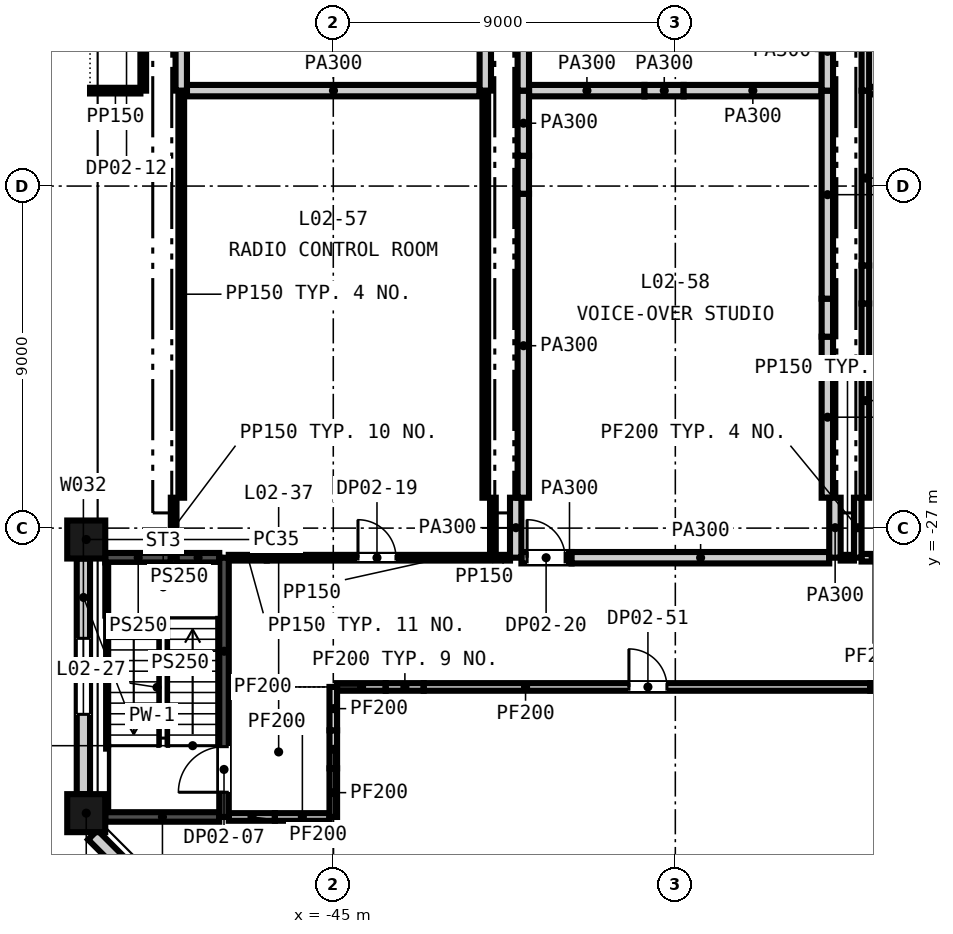
"""IFC4 building model, lengths in metres.
Left out: names, types, materials, properties, quantities, classifications, styles, units other than length and angle.
Written with IfcOpenShell. Run it as: python <this file> out.ifc"""

import sys

from ifc_helpers import new_model, si_unit, direction, frame, frame_2d, origin, origin_2d, place, context, subcontext, project, spatial, rectangle, extrude, element, fill, save


model = new_model("IFC4")
c1 = context("Model", 3, precision=1e-05, world=origin(), true_north=direction((0.0, 1.0)))
c2 = subcontext(c1, "Body", "Model", "MODEL_VIEW")
j1 = project(units=[si_unit("LENGTHUNIT", "METRE"), si_unit("PLANEANGLEUNIT", "RADIAN")], contexts=[c1])
p1 = place(None, origin())
s1 = spatial("IfcSite", under=j1, at=p1, CompositionType="ELEMENT")
p2 = place(p1, origin())
s2 = spatial("IfcBuilding", under=s1, at=p2, CompositionType="ELEMENT")
p3 = place(p2, frame((0.0, 0.0, 18.0)))
s3 = spatial("IfcBuildingStorey", under=s2, at=p3, CompositionType="ELEMENT", Elevation=18.0)
for number, where, z_axis, x_axis in (
    (1, (-51.5, -34.5, -0.4), (0.0, 0.0, 1.0), (0.0, -1.0, 0.0)),
    (2, (-51.5, -27.3, -0.4), (0.0, 0.0, 1.0), (0.0, 1.0, 0.0)),
):
    element("IfcColumn", number, at=place(p3, frame(where, z_axis=z_axis, x_axis=x_axis)), inside=s3, PredefinedType="COLUMN", context=c2, shape_type="SweptSolid", body=[
        extrude(rectangle(XDim=1.0, YDim=1.0, at=origin_2d()), origin(), (0.0, 0.0, 1.0), 4.6),
    ])
p4 = place(p3, frame((-51.575, -27.8, -0.4), z_axis=(0.0, 0.0, 1.0), x_axis=(0.0, -1.0, 0.0)))
e3 = element("IfcWall", 3, at=p4, inside=s3, PredefinedType="SOLIDWALL", context=c2, shape_type="SweptSolid", body=[
    extrude(rectangle(XDim=6.2, YDim=0.35, at=frame_2d((3.1, 0.0))), origin(), (0.0, 0.0, 1.0), 3.7),
])
p5 = place(p4, frame((2.1, 0.0, 1.3)))
e4 = element("IfcOpeningElement", 4, at=p5, cuts=e3, PredefinedType="OPENING", context=c2, shape_type="SweptSolid", body=[
    extrude(rectangle(XDim=2.0, YDim=2.35, at=frame_2d((1.0, 1.175))), frame((0.0, 0.185, 0.0), z_axis=(0.0, -1.0, 0.0), x_axis=(1.0, 0.0, 0.0)), (0.0, 0.0, 1.0), 0.37),
])
p6 = place(p3, frame((-51.327, -35.072, -0.4), z_axis=(0.0, 0.0, 1.0), x_axis=(0.707106781187, -0.707106781187, 0.0)))
e5 = element("IfcWall", 5, at=p6, inside=s3, PredefinedType="SOLIDWALL", context=c2, shape_type="SweptSolid", body=[
    extrude(rectangle(XDim=7.433, YDim=0.35, at=frame_2d((3.716, 0.0))), origin(), (0.0, 0.0, 1.0), 3.7),
])
p7 = place(p3, frame((-51.0, -34.6, 0.0), z_axis=(0.0, 0.0, 1.0), x_axis=(1.0, 0.0, 0.0)))
e6 = element("IfcWall", 6, at=p7, inside=s3, PredefinedType="SHEAR", context=c2, shape_type="SweptSolid", body=[
    extrude(rectangle(XDim=3.0, YDim=0.25, at=frame_2d((1.5, 0.0))), origin(), (0.0, 0.0, 1.0), 4.2),
])
p8 = place(p3, frame((-47.75, -34.6, 0.0), z_axis=(0.0, 0.0, 1.0), x_axis=(1.0, 0.0, 0.0)))
e7 = element("IfcWall", 7, at=p8, inside=s3, PredefinedType="PARTITIONING", context=c2, shape_type="SweptSolid", body=[
    extrude(rectangle(XDim=1.213, YDim=0.2, at=frame_2d((0.607, 0.0))), origin(), (0.0, 0.0, 1.0), 3.219),
])
p9 = place(p3, frame((-46.537, -34.6, 0.0), z_axis=(0.0, 0.0, 1.0), x_axis=(1.0, 0.0, 0.0)))
e8 = element("IfcWall", 8, at=p9, inside=s3, PredefinedType="PARTITIONING", context=c2, shape_type="SweptSolid", body=[
    extrude(rectangle(XDim=1.437, YDim=0.2, at=frame_2d((0.718, 0.0))), origin(), (0.0, 0.0, 1.0), 4.2),
])
p10 = place(p3, frame((-44.9, -31.179, 0.0), z_axis=(0.0, 0.0, 1.0), x_axis=(1.0, 0.0, 0.0)))
e9 = element("IfcWall", 9, at=p10, inside=s3, PredefinedType="PARTITIONING", context=c2, shape_type="SweptSolid", body=[
    extrude(rectangle(XDim=1.279, YDim=0.2, at=frame_2d((0.64, 0.0))), origin(), (0.0, 0.0, 1.0), 4.2),
])
p11 = place(p3, frame((-43.621, -31.179, 0.0), z_axis=(0.0, 0.0, 1.0), x_axis=(1.0, 0.0, 0.0)))
e10 = element("IfcWall", 10, at=p11, inside=s3, PredefinedType="PARTITIONING", context=c2, shape_type="SweptSolid", body=[
    extrude(rectangle(XDim=1.0, YDim=0.2, at=frame_2d((0.5, 0.0))), origin(), (0.0, 0.0, 1.0), 3.219),
])
p12 = place(p3, frame((-42.621, -31.179, 0.0), z_axis=(0.0, 0.0, 1.0), x_axis=(1.0, 0.0, 0.0)))
e11 = element("IfcWall", 11, at=p12, inside=s3, PredefinedType="PARTITIONING", context=c2, shape_type="SweptSolid", body=[
    extrude(rectangle(XDim=11.75, YDim=0.2, at=frame_2d((5.875, 0.0))), origin(), (0.0, 0.0, 1.0), 4.2),
])
p13 = place(p12, frame((5.4, 0.0, 0.0)))
e12 = element("IfcOpeningElement", 12, at=p13, cuts=e11, PredefinedType="OPENING", context=c2, shape_type="SweptSolid", body=[
    extrude(rectangle(XDim=1.0, YDim=2.1, at=frame_2d((0.5, 1.05))), frame((0.0, 0.11, 0.0), z_axis=(0.0, -1.0, 0.0), x_axis=(1.0, 0.0, 0.0)), (0.0, 0.0, 1.0), 0.22),
])
p14 = place(p3, frame((-30.871, -31.179, 0.0), z_axis=(0.0, 0.0, 1.0), x_axis=(1.0, 0.0, 0.0)))
e13 = element("IfcWall", 13, at=p14, inside=s3, PredefinedType="PARTITIONING", context=c2, shape_type="SweptSolid", body=[
    extrude(rectangle(XDim=1.0, YDim=0.2, at=frame_2d((0.5, 0.0))), origin(), (0.0, 0.0, 1.0), 3.219),
])
p15 = place(p3, frame((-51.0, -27.779, 0.0), z_axis=(0.0, 0.0, 1.0), x_axis=(1.0, 0.0, 0.0)))
e14 = element("IfcWall", 14, at=p15, inside=s3, PredefinedType="SHEAR", context=c2, shape_type="SweptSolid", body=[
    extrude(rectangle(XDim=1.725, YDim=0.25, at=frame_2d((0.863, 0.0))), origin(), (0.0, 0.0, 1.0), 4.2),
])
p16 = place(p3, frame((-49.125, -27.779, 0.0), z_axis=(0.0, 0.0, 1.0), x_axis=(1.0, 0.0, 0.0)))
e15 = element("IfcWall", 15, at=p16, inside=s3, PredefinedType="SHEAR", context=c2, shape_type="SweptSolid", body=[
    extrude(rectangle(XDim=1.125, YDim=0.25, at=frame_2d((0.562, 0.0))), origin(), (0.0, 0.0, 1.0), 4.2),
])
p17 = place(p3, frame((-47.75, -27.779, 0.0), z_axis=(0.0, 0.0, 1.0), x_axis=(1.0, 0.0, 0.0)))
e16 = element("IfcWall", 16, at=p17, inside=s3, PredefinedType="PARTITIONING", context=c2, shape_type="SweptSolid", body=[
    extrude(rectangle(XDim=1.0, YDim=0.15, at=frame_2d((0.5, 0.0))), origin(), (0.0, 0.0, 1.0), 3.667),
])
p18 = place(p3, frame((-46.75, -27.779, 0.0), z_axis=(0.0, 0.0, 1.0), x_axis=(1.0, 0.0, 0.0)))
e17 = element("IfcWall", 17, at=p18, inside=s3, PredefinedType="PARTITIONING", context=c2, shape_type="SweptSolid", body=[
    extrude(rectangle(XDim=5.875, YDim=0.15, at=frame_2d((2.938, 0.0))), origin(), (0.0, 0.0, 1.0), 4.2),
])
p19 = place(p18, frame((2.4, 0.0, 0.0)))
e18 = element("IfcOpeningElement", 18, at=p19, cuts=e17, PredefinedType="OPENING", context=c2, shape_type="SweptSolid", body=[
    extrude(rectangle(XDim=1.0, YDim=2.1, at=frame_2d((0.5, 1.05))), frame((0.0, 0.085, 0.0), z_axis=(0.0, -1.0, 0.0), x_axis=(1.0, 0.0, 0.0)), (0.0, 0.0, 1.0), 0.17),
])
p20 = place(p3, frame((-40.725, -27.779, 0.0), z_axis=(0.0, 0.0, 1.0), x_axis=(1.0, 0.0, 0.0)))
e19 = element("IfcWall", 19, at=p20, inside=s3, PredefinedType="PARTITIONING", context=c2, shape_type="SweptSolid", body=[
    extrude(rectangle(XDim=0.375, YDim=0.15, at=frame_2d((0.188, 0.0))), origin(), (0.0, 0.0, 1.0), 4.2),
])
p21 = place(p3, frame((-40.05, -27.779, 0.0), z_axis=(0.0, 0.0, 1.0), x_axis=(1.0, 0.0, 0.0)))
e20 = element("IfcWall", 20, at=p21, inside=s3, PredefinedType="PARTITIONING", context=c2, shape_type="SweptSolid", body=[
    extrude(rectangle(XDim=1.321, YDim=0.3, at=frame_2d((0.66, 0.0))), origin(), (0.0, 0.0, 1.0), 3.219),
])
p22 = place(p21, frame((0.15, 0.0, 0.0)))
e21 = element("IfcOpeningElement", 21, at=p22, cuts=e20, PredefinedType="OPENING", context=c2, shape_type="SweptSolid", body=[
    extrude(rectangle(XDim=1.0, YDim=2.1, at=frame_2d((0.5, 1.05))), frame((0.0, 0.16, 0.0), z_axis=(0.0, -1.0, 0.0), x_axis=(1.0, 0.0, 0.0)), (0.0, 0.0, 1.0), 0.32),
])
p23 = place(p3, frame((-38.729, -27.779, 0.0), z_axis=(0.0, 0.0, 1.0), x_axis=(1.0, 0.0, 0.0)))
e22 = element("IfcWall", 22, at=p23, inside=s3, PredefinedType="PARTITIONING", context=c2, shape_type="SweptSolid", body=[
    extrude(rectangle(XDim=6.779, YDim=0.3, at=frame_2d((3.39, 0.0))), origin(), (0.0, 0.0, 1.0), 4.2),
])
p24 = place(p3, frame((-31.65, -27.779, 0.0), z_axis=(0.0, 0.0, 1.0), x_axis=(1.0, 0.0, 0.0)))
e23 = element("IfcWall", 23, at=p24, inside=s3, PredefinedType="PARTITIONING", context=c2, shape_type="SweptSolid", body=[
    extrude(rectangle(XDim=0.35, YDim=0.15, at=frame_2d((0.175, 0.0))), origin(), (0.0, 0.0, 1.0), 4.2),
])
p25 = place(p3, frame((-31.1, -27.779, 0.0), z_axis=(0.0, 0.0, 1.0), x_axis=(1.0, 0.0, 0.0)))
e24 = element("IfcWall", 24, at=p25, inside=s3, PredefinedType="PARTITIONING", context=c2, shape_type="SweptSolid", body=[
    extrude(rectangle(XDim=2.941, YDim=0.2, at=frame_2d((1.47, 0.0))), origin(), (0.0, 0.0, 1.0), 4.2),
])
p26 = place(p25, frame((0.65, 0.0, 0.0)))
e25 = element("IfcOpeningElement", 25, at=p26, cuts=e24, PredefinedType="OPENING", context=c2, shape_type="SweptSolid", body=[
    extrude(rectangle(XDim=1.8, YDim=2.4, at=frame_2d((0.9, 1.2))), frame((0.0, 0.11, 0.0), z_axis=(0.0, -1.0, 0.0), x_axis=(1.0, 0.0, 0.0)), (0.0, 0.0, 1.0), 0.22),
])
p27 = place(p3, frame((-51.4, -15.489, 0.0), z_axis=(0.0, 0.0, 1.0), x_axis=(1.0, 0.0, 0.0)))
e26 = element("IfcWall", 26, at=p27, inside=s3, PredefinedType="PARTITIONING", context=c2, shape_type="SweptSolid", body=[
    extrude(rectangle(XDim=1.325, YDim=0.15, at=frame_2d((0.663, 0.0))), origin(), (0.0, 0.0, 1.0), 4.2),
])
p28 = place(p3, frame((-48.85, -15.489, 0.0), z_axis=(0.0, 0.0, 1.0), x_axis=(1.0, 0.0, 0.0)))
e27 = element("IfcWall", 27, at=p28, inside=s3, PredefinedType="PARTITIONING", context=c2, shape_type="SweptSolid", body=[
    extrude(rectangle(XDim=7.7, YDim=0.3, at=frame_2d((3.85, 0.0))), origin(), (0.0, 0.0, 1.0), 4.2),
])
p29 = place(p3, frame((-39.85, -15.489, 0.0), z_axis=(0.0, 0.0, 1.0), x_axis=(1.0, 0.0, 0.0)))
e28 = element("IfcWall", 28, at=p29, inside=s3, PredefinedType="PARTITIONING", context=c2, shape_type="SweptSolid", body=[
    extrude(rectangle(XDim=3.039, YDim=0.3, at=frame_2d((1.52, 0.0))), origin(), (0.0, 0.0, 1.0), 4.2),
])
p30 = place(p3, frame((-36.811, -15.489, 0.0), z_axis=(0.0, 0.0, 1.0), x_axis=(1.0, 0.0, 0.0)))
e29 = element("IfcWall", 29, at=p30, inside=s3, PredefinedType="PARTITIONING", context=c2, shape_type="SweptSolid", body=[
    extrude(rectangle(XDim=1.031, YDim=0.3, at=frame_2d((0.515, 0.0))), origin(), (0.0, 0.0, 1.0), 3.597),
])
p31 = place(p3, frame((-35.781, -15.489, 0.0), z_axis=(0.0, 0.0, 1.0), x_axis=(1.0, 0.0, 0.0)))
e30 = element("IfcWall", 30, at=p31, inside=s3, PredefinedType="PARTITIONING", context=c2, shape_type="SweptSolid", body=[
    extrude(rectangle(XDim=3.631, YDim=0.3, at=frame_2d((1.815, 0.0))), origin(), (0.0, 0.0, 1.0), 4.2),
])
p32 = place(p3, frame((-30.9, -15.489, 0.0), z_axis=(0.0, 0.0, 1.0), x_axis=(1.0, 0.0, 0.0)))
e31 = element("IfcWall", 31, at=p32, inside=s3, PredefinedType="PARTITIONING", context=c2, shape_type="SweptSolid", body=[
    extrude(rectangle(XDim=2.777, YDim=0.2, at=frame_2d((1.388, 0.0))), origin(), (0.0, 0.0, 1.0), 4.2),
])
p33 = place(p32, frame((0.9, 0.0, 0.0)))
e32 = element("IfcOpeningElement", 32, at=p33, cuts=e31, PredefinedType="OPENING", context=c2, shape_type="SweptSolid", body=[
    extrude(rectangle(XDim=0.9, YDim=2.1, at=frame_2d((0.45, 1.05))), frame((0.0, 0.11, 0.0), z_axis=(0.0, -1.0, 0.0), x_axis=(1.0, 0.0, 0.0)), (0.0, 0.0, 1.0), 0.22),
])
p34 = place(p3, frame((-50.0, -15.49, 0.0), z_axis=(0.0, 0.0, 1.0), x_axis=(0.0, 1.0, 0.0)))
e33 = element("IfcWall", 33, at=p34, inside=s3, PredefinedType="PARTITIONING", context=c2, shape_type="SweptSolid", body=[
    extrude(rectangle(XDim=5.689, YDim=0.15, at=frame_2d((2.845, 0.0))), origin(), (0.0, 0.0, 1.0), 4.2),
])
p35 = place(p3, frame((-49.2, -27.778, 0.0), z_axis=(0.0, 0.0, 1.0), x_axis=(0.0, 1.0, 0.0)))
e34 = element("IfcWall", 34, at=p35, inside=s3, PredefinedType="PARTITIONING", context=c2, shape_type="SweptSolid", body=[
    extrude(rectangle(XDim=1.578, YDim=0.15, at=frame_2d((0.789, 0.0))), origin(), (0.0, 0.0, 1.0), 4.2),
])
p36 = place(p3, frame((-49.0, -26.2, 0.0), z_axis=(0.0, 0.0, 1.0), x_axis=(0.0, 1.0, 0.0)))
e35 = element("IfcWall", 35, at=p36, inside=s3, PredefinedType="PARTITIONING", context=c2, shape_type="SweptSolid", body=[
    extrude(rectangle(XDim=10.709, YDim=0.15, at=frame_2d((5.355, 0.0))), origin(), (0.0, 0.0, 1.0), 4.2),
])
p37 = place(p3, frame((-49.0, -15.489, 0.0), z_axis=(0.0, 0.0, 1.0), x_axis=(0.0, 1.0, 0.0)))
e36 = element("IfcWall", 36, at=p37, inside=s3, PredefinedType="PARTITIONING", context=c2, shape_type="SweptSolid", body=[
    extrude(rectangle(XDim=2.556, YDim=0.3, at=frame_2d((1.278, 0.0))), origin(), (0.0, 0.0, 1.0), 4.2),
])
p38 = place(p3, frame((-47.875, -34.6, 0.0), z_axis=(0.0, 0.0, 1.0), x_axis=(0.0, 1.0, 0.0)))
e37 = element("IfcWall", 37, at=p38, inside=s3, PredefinedType="SHEAR", context=c2, shape_type="SweptSolid", body=[
    extrude(rectangle(XDim=6.821, YDim=0.25, at=frame_2d((3.411, 0.0))), origin(), (0.0, 0.0, 1.0), 4.2),
])
p39 = place(p38, frame((0.65, 0.0, 0.0)))
e38 = element("IfcOpeningElement", 38, at=p39, cuts=e37, PredefinedType="OPENING", context=c2, shape_type="SweptSolid", body=[
    extrude(rectangle(XDim=1.2, YDim=2.1, at=frame_2d((0.6, 1.05))), frame((0.0, 0.135, 0.0), z_axis=(0.0, -1.0, 0.0), x_axis=(1.0, 0.0, 0.0)), (0.0, 0.0, 1.0), 0.27),
])
p40 = place(p3, frame((-45.0, -34.6, 0.0), z_axis=(0.0, 0.0, 1.0), x_axis=(0.0, 1.0, 0.0)))
e39 = element("IfcWall", 39, at=p40, inside=s3, PredefinedType="PARTITIONING", context=c2, shape_type="SweptSolid", body=[
    extrude(rectangle(XDim=1.279, YDim=0.2, at=frame_2d((0.64, 0.0))), origin(), (0.0, 0.0, 1.0), 4.2),
])
p41 = place(p3, frame((-45.0, -33.321, 0.0), z_axis=(0.0, 0.0, 1.0), x_axis=(0.0, 1.0, 0.0)))
e40 = element("IfcWall", 40, at=p41, inside=s3, PredefinedType="PARTITIONING", context=c2, shape_type="SweptSolid", body=[
    extrude(rectangle(XDim=1.0, YDim=0.2, at=frame_2d((0.5, 0.0))), origin(), (0.0, 0.0, 1.0), 3.219),
])
p42 = place(p3, frame((-45.0, -32.321, 0.0), z_axis=(0.0, 0.0, 1.0), x_axis=(0.0, 1.0, 0.0)))
e41 = element("IfcWall", 41, at=p42, inside=s3, PredefinedType="PARTITIONING", context=c2, shape_type="SweptSolid", body=[
    extrude(rectangle(XDim=1.142, YDim=0.2, at=frame_2d((0.571, 0.0))), origin(), (0.0, 0.0, 1.0), 4.2),
])
p43 = place(p3, frame((-41.0, -26.2, 0.0), z_axis=(0.0, 0.0, 1.0), x_axis=(0.0, 1.0, 0.0)))
e42 = element("IfcWall", 42, at=p43, inside=s3, PredefinedType="PARTITIONING", context=c2, shape_type="SweptSolid", body=[
    extrude(rectangle(XDim=10.709, YDim=0.15, at=frame_2d((5.355, 0.0))), origin(), (0.0, 0.0, 1.0), 4.2),
])
p44 = place(p3, frame((-41.0, -15.489, 0.0), z_axis=(0.0, 0.0, 1.0), x_axis=(0.0, 1.0, 0.0)))
e43 = element("IfcWall", 43, at=p44, inside=s3, PredefinedType="PARTITIONING", context=c2, shape_type="SweptSolid", body=[
    extrude(rectangle(XDim=5.688, YDim=0.3, at=frame_2d((2.844, 0.0))), origin(), (0.0, 0.0, 1.0), 4.2),
])
p45 = place(p3, frame((-40.8, -27.778, 0.0), z_axis=(0.0, 0.0, 1.0), x_axis=(0.0, 1.0, 0.0)))
e44 = element("IfcWall", 44, at=p45, inside=s3, PredefinedType="PARTITIONING", context=c2, shape_type="SweptSolid", body=[
    extrude(rectangle(XDim=1.578, YDim=0.15, at=frame_2d((0.789, 0.0))), origin(), (0.0, 0.0, 1.0), 4.2),
])
p46 = place(p3, frame((-40.2, -27.778, 0.0), z_axis=(0.0, 0.0, 1.0), x_axis=(0.0, 1.0, 0.0)))
e45 = element("IfcWall", 45, at=p46, inside=s3, PredefinedType="PARTITIONING", context=c2, shape_type="SweptSolid", body=[
    extrude(rectangle(XDim=1.578, YDim=0.3, at=frame_2d((0.789, 0.0))), origin(), (0.0, 0.0, 1.0), 4.2),
])
p47 = place(p3, frame((-40.0, -26.2, 0.0), z_axis=(0.0, 0.0, 1.0), x_axis=(0.0, 1.0, 0.0)))
e46 = element("IfcWall", 46, at=p47, inside=s3, PredefinedType="PARTITIONING", context=c2, shape_type="SweptSolid", body=[
    extrude(rectangle(XDim=7.998, YDim=0.3, at=frame_2d((3.999, 0.0))), origin(), (0.0, 0.0, 1.0), 4.2),
])
p48 = place(p3, frame((-40.0, -18.202, 0.0), z_axis=(0.0, 0.0, 1.0), x_axis=(0.0, 1.0, 0.0)))
e47 = element("IfcWall", 47, at=p48, inside=s3, PredefinedType="PARTITIONING", context=c2, shape_type="SweptSolid", body=[
    extrude(rectangle(XDim=1.0, YDim=0.3, at=frame_2d((0.5, 0.0))), origin(), (0.0, 0.0, 1.0), 3.597),
])
p49 = place(p3, frame((-40.0, -17.202, 0.0), z_axis=(0.0, 0.0, 1.0), x_axis=(0.0, 1.0, 0.0)))
e48 = element("IfcWall", 48, at=p49, inside=s3, PredefinedType="PARTITIONING", context=c2, shape_type="SweptSolid", body=[
    extrude(rectangle(XDim=1.711, YDim=0.3, at=frame_2d((0.856, 0.0))), origin(), (0.0, 0.0, 1.0), 4.2),
])
p50 = place(p3, frame((-40.0, -15.489, 0.0), z_axis=(0.0, 0.0, 1.0), x_axis=(0.0, 1.0, 0.0)))
e49 = element("IfcWall", 49, at=p50, inside=s3, PredefinedType="PARTITIONING", context=c2, shape_type="SweptSolid", body=[
    extrude(rectangle(XDim=5.688, YDim=0.3, at=frame_2d((2.844, 0.0))), origin(), (0.0, 0.0, 1.0), 4.2),
])
p51 = place(p3, frame((-32.0, -26.2, 0.0), z_axis=(0.0, 0.0, 1.0), x_axis=(0.0, 1.0, 0.0)))
e50 = element("IfcWall", 50, at=p51, inside=s3, PredefinedType="PARTITIONING", context=c2, shape_type="SweptSolid", body=[
    extrude(rectangle(XDim=4.237, YDim=0.3, at=frame_2d((2.119, 0.0))), origin(), (0.0, 0.0, 1.0), 4.2),
])
p52 = place(p3, frame((-32.0, -21.963, 0.0), z_axis=(0.0, 0.0, 1.0), x_axis=(0.0, 1.0, 0.0)))
e51 = element("IfcWall", 51, at=p52, inside=s3, PredefinedType="PARTITIONING", context=c2, shape_type="SweptSolid", body=[
    extrude(rectangle(XDim=1.0, YDim=0.3, at=frame_2d((0.5, 0.0))), origin(), (0.0, 0.0, 1.0), 3.219),
])
p53 = place(p3, frame((-32.0, -20.963, 0.0), z_axis=(0.0, 0.0, 1.0), x_axis=(0.0, 1.0, 0.0)))
e52 = element("IfcWall", 52, at=p53, inside=s3, PredefinedType="PARTITIONING", context=c2, shape_type="SweptSolid", body=[
    extrude(rectangle(XDim=5.472, YDim=0.3, at=frame_2d((2.736, 0.0))), origin(), (0.0, 0.0, 1.0), 4.2),
])
p54 = place(p3, frame((-32.0, -15.489, 0.0), z_axis=(0.0, 0.0, 1.0), x_axis=(0.0, 1.0, 0.0)))
e53 = element("IfcWall", 53, at=p54, inside=s3, PredefinedType="PARTITIONING", context=c2, shape_type="SweptSolid", body=[
    extrude(rectangle(XDim=2.066, YDim=0.3, at=frame_2d((1.033, 0.0))), origin(), (0.0, 0.0, 1.0), 4.2),
])
p55 = place(p3, frame((-31.8, -27.778, 0.0), z_axis=(0.0, 0.0, 1.0), x_axis=(0.0, 1.0, 0.0)))
e54 = element("IfcWall", 54, at=p55, inside=s3, PredefinedType="PARTITIONING", context=c2, shape_type="SweptSolid", body=[
    extrude(rectangle(XDim=1.578, YDim=0.3, at=frame_2d((0.789, 0.0))), origin(), (0.0, 0.0, 1.0), 4.2),
])
p56 = place(p3, frame((-31.2, -27.778, 0.0), z_axis=(0.0, 0.0, 1.0), x_axis=(0.0, 1.0, 0.0)))
e55 = element("IfcWall", 55, at=p56, inside=s3, PredefinedType="PARTITIONING", context=c2, shape_type="SweptSolid", body=[
    extrude(rectangle(XDim=1.578, YDim=0.2, at=frame_2d((0.789, 0.0))), origin(), (0.0, 0.0, 1.0), 4.2),
])
p57 = place(p3, frame((-31.0, -26.2, 0.0), z_axis=(0.0, 0.0, 1.0), x_axis=(0.0, 1.0, 0.0)))
e56 = element("IfcWall", 56, at=p57, inside=s3, PredefinedType="PARTITIONING", context=c2, shape_type="SweptSolid", body=[
    extrude(rectangle(XDim=5.111, YDim=0.2, at=frame_2d((2.555, 0.0))), origin(), (0.0, 0.0, 1.0), 4.2),
])
p58 = place(p3, frame((-31.0, -21.089, 0.0), z_axis=(0.0, 0.0, 1.0), x_axis=(0.0, 1.0, 0.0)))
e57 = element("IfcWall", 57, at=p58, inside=s3, PredefinedType="PARTITIONING", context=c2, shape_type="SweptSolid", body=[
    extrude(rectangle(XDim=1.0, YDim=0.2, at=frame_2d((0.5, 0.0))), origin(), (0.0, 0.0, 1.0), 3.597),
])
p59 = place(p3, frame((-31.0, -20.089, 0.0), z_axis=(0.0, 0.0, 1.0), x_axis=(0.0, 1.0, 0.0)))
e58 = element("IfcWall", 58, at=p59, inside=s3, PredefinedType="PARTITIONING", context=c2, shape_type="SweptSolid", body=[
    extrude(rectangle(XDim=4.599, YDim=0.2, at=frame_2d((2.299, 0.0))), origin(), (0.0, 0.0, 1.0), 4.2),
])
p60 = place(p3, frame((-31.0, -15.489, 0.0), z_axis=(0.0, 0.0, 1.0), x_axis=(0.0, 1.0, 0.0)))
e59 = element("IfcWall", 59, at=p60, inside=s3, PredefinedType="PARTITIONING", context=c2, shape_type="SweptSolid", body=[
    extrude(rectangle(XDim=4.982, YDim=0.2, at=frame_2d((2.491, 0.0))), origin(), (0.0, 0.0, 1.0), 4.2),
])
p61 = place(p5, origin())
e60 = element("IfcWindow", 60, at=p61, inside=s3, PartitioningType="SINGLE_PANEL", PredefinedType="WINDOW", context=c2, shape_type="SweptSolid", body=[
    extrude(rectangle(XDim=2.0, YDim=2.35, at=frame_2d((1.0, 1.175))), frame((0.0, 0.03, 0.0), z_axis=(0.0, -1.0, 0.0), x_axis=(1.0, 0.0, 0.0)), (0.0, 0.0, 1.0), 0.06),
])
fill(e4, e60)
p62 = place(p39, origin())
e61 = element("IfcDoor", 61, at=p62, inside=s3, OperationType="SINGLE_SWING_LEFT", PredefinedType="DOOR", context=c2, shape_type="SweptSolid", body=[
    extrude(rectangle(XDim=1.2, YDim=2.1, at=frame_2d((0.6, 1.05))), frame((0.0, 0.025, 0.0), z_axis=(0.0, -1.0, 0.0), x_axis=(1.0, 0.0, 0.0)), (0.0, 0.0, 1.0), 0.05),
])
fill(e38, e61)
p63 = place(p19, origin())
e62 = element("IfcDoor", 62, at=p63, inside=s3, OperationType="SINGLE_SWING_LEFT", PredefinedType="DOOR", context=c2, shape_type="SweptSolid", body=[
    extrude(rectangle(XDim=1.0, YDim=2.1, at=frame_2d((0.5, 1.05))), frame((0.0, 0.025, 0.0), z_axis=(0.0, -1.0, 0.0), x_axis=(1.0, 0.0, 0.0)), (0.0, 0.0, 1.0), 0.05),
])
fill(e18, e62)
p64 = place(p22, origin())
e63 = element("IfcDoor", 63, at=p64, inside=s3, OperationType="SINGLE_SWING_LEFT", PredefinedType="DOOR", context=c2, shape_type="SweptSolid", body=[
    extrude(rectangle(XDim=1.0, YDim=2.1, at=frame_2d((0.5, 1.05))), frame((0.0, 0.025, 0.0), z_axis=(0.0, -1.0, 0.0), x_axis=(1.0, 0.0, 0.0)), (0.0, 0.0, 1.0), 0.05),
])
fill(e21, e63)
p65 = place(p13, origin())
e64 = element("IfcDoor", 64, at=p65, inside=s3, OperationType="SINGLE_SWING_LEFT", PredefinedType="DOOR", context=c2, shape_type="SweptSolid", body=[
    extrude(rectangle(XDim=1.0, YDim=2.1, at=frame_2d((0.5, 1.05))), frame((0.0, 0.025, 0.0), z_axis=(0.0, -1.0, 0.0), x_axis=(1.0, 0.0, 0.0)), (0.0, 0.0, 1.0), 0.05),
])
fill(e12, e64)
save(model, sys.argv[1])
